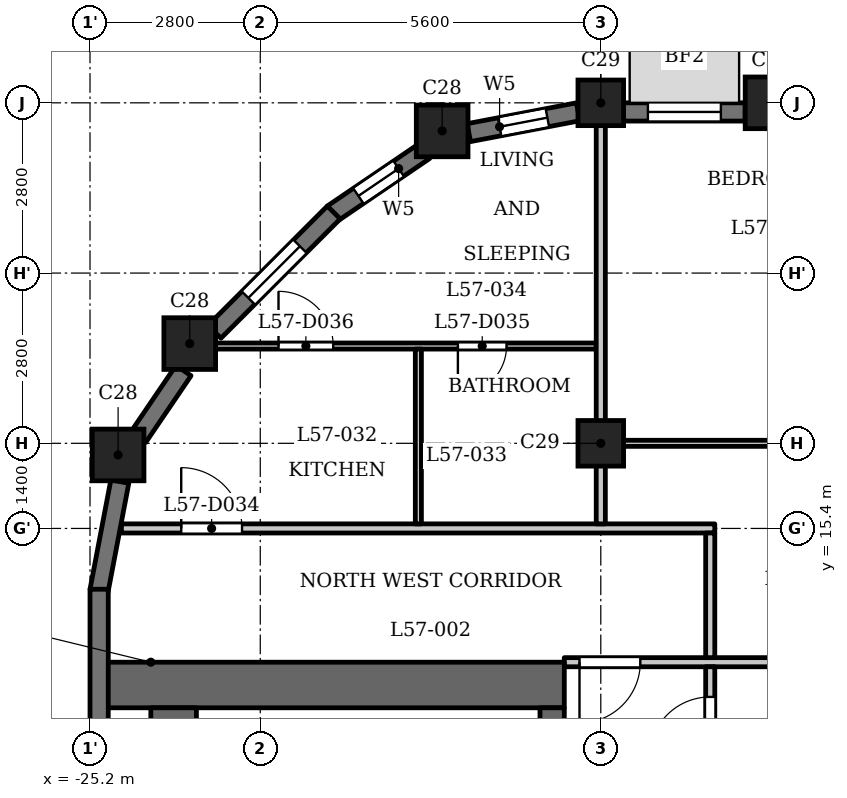
"""IFC4 building model, lengths in metres.
Left out: names, types, materials, properties, quantities, classifications, styles, units other than length and angle.
Written with IfcOpenShell. Run it as: python <this file> out.ifc"""

import sys

from ifc_helpers import new_model, si_unit, direction, frame, frame_2d, origin, origin_2d, place, context, subcontext, project, spatial, rectangle, extrude, element, fill, save


model = new_model("IFC4")
c1 = context("Model", 3, precision=1e-05, world=origin(), true_north=direction((0.0, 1.0)))
c2 = subcontext(c1, "Body", "Model", "MODEL_VIEW")
j1 = project(units=[si_unit("LENGTHUNIT", "METRE"), si_unit("PLANEANGLEUNIT", "RADIAN")], contexts=[c1])
p1 = place(None, origin())
s1 = spatial("IfcSite", under=j1, at=p1, CompositionType="ELEMENT")
p2 = place(p1, origin())
s2 = spatial("IfcBuilding", under=s1, at=p2, CompositionType="ELEMENT")
p3 = place(p2, frame((0.0, 0.0, 220.4)))
s3 = spatial("IfcBuildingStorey", under=s2, at=p3, CompositionType="ELEMENT", Elevation=220.4)
for number, where, z_axis, x_axis in (
    (1, (-14.0, 22.4, 0.0), (0.0, 0.0, 1.0), (1.0, 0.0, 0.0)),
    (2, (-19.409, 21.938, 0.0), (0.0, 0.0, 1.0), (1.0, 0.0, 0.0)),
    (3, (-23.56, 18.44, 0.0), (0.0, 0.0, 1.0), (1.0, 0.0, 0.0)),
    (4, (-24.738, 16.609, 0.0), (0.0, 0.0, 1.0), (1.0, 0.0, 0.0)),
):
    element("IfcColumn", number, at=place(p3, frame(where, z_axis=z_axis, x_axis=x_axis)), inside=s3, PredefinedType="COLUMN", context=c2, shape_type="SweptSolid", body=[
        extrude(rectangle(XDim=0.85, YDim=0.85, at=origin_2d()), origin(), (0.0, 0.0, 1.0), 3.5),
    ])
for number, where, z_axis, x_axis in (
    (5, (-16.8, 16.8, 0.0), (0.0, 0.0, 1.0), (1.0, 0.0, 0.0)),
    (6, (-16.8, 22.4, 0.0), (0.0, 0.0, 1.0), (1.0, 0.0, 0.0)),
):
    element("IfcColumn", number, at=place(p3, frame(where, z_axis=z_axis, x_axis=x_axis)), inside=s3, PredefinedType="COLUMN", context=c2, shape_type="SweptSolid", body=[
        extrude(rectangle(XDim=0.75, YDim=0.75, at=origin_2d()), origin(), (0.0, 0.0, 1.0), 3.5),
    ])
p4 = place(p3, frame((-14.425, 22.25, 0.0), z_axis=(0.0, 0.0, 1.0), x_axis=(-1.0, 0.0, 0.0)))
e7 = element("IfcWall", 7, at=p4, inside=s3, PredefinedType="SOLIDWALL", context=c2, shape_type="SweptSolid", body=[
    extrude(rectangle(XDim=2.0, YDim=0.3, at=frame_2d((1.0, 0.0))), origin(), (0.0, 0.0, 1.0), 2.5),
])
p5 = place(p4, frame((0.4, 0.0, 0.6)))
e8 = element("IfcOpeningElement", 8, at=p5, cuts=e7, PredefinedType="OPENING", context=c2, shape_type="SweptSolid", body=[
    extrude(rectangle(XDim=1.2, YDim=1.55, at=frame_2d((0.6, 0.775))), frame((0.0, 0.16, 0.0), z_axis=(0.0, -1.0, 0.0), x_axis=(1.0, 0.0, 0.0)), (0.0, 0.0, 1.0), 0.32),
])
p6 = place(p3, frame((-17.172, 22.253, 0.0), z_axis=(0.0, 0.0, 1.0), x_axis=(-0.982300037503, -0.187314271538, 0.0)))
e9 = element("IfcWall", 9, at=p6, inside=s3, PredefinedType="SOLIDWALL", context=c2, shape_type="SweptSolid", body=[
    extrude(rectangle(XDim=1.831, YDim=0.3, at=frame_2d((0.916, 0.0))), origin(), (0.0, 0.0, 1.0), 2.5),
])
p7 = place(p6, frame((0.516, 0.0, 0.6)))
e10 = element("IfcOpeningElement", 10, at=p7, cuts=e9, PredefinedType="OPENING", context=c2, shape_type="SweptSolid", body=[
    extrude(rectangle(XDim=0.8, YDim=1.55, at=frame_2d((0.4, 0.775))), frame((0.0, 0.16, 0.0), z_axis=(0.0, -1.0, 0.0), x_axis=(1.0, 0.0, 0.0)), (0.0, 0.0, 1.0), 0.32),
])
p8 = place(p3, frame((-19.698, 21.608, 0.0), z_axis=(0.0, 0.0, 1.0), x_axis=(-0.82705295608, -0.562124014644, 0.0)))
e11 = element("IfcWall", 11, at=p8, inside=s3, PredefinedType="SOLIDWALL", context=c2, shape_type="SweptSolid", body=[
    extrude(rectangle(XDim=1.831, YDim=0.3, at=frame_2d((0.916, 0.0))), origin(), (0.0, 0.0, 1.0), 2.5),
])
p9 = place(p8, frame((0.516, 0.0, 0.6)))
e12 = element("IfcOpeningElement", 12, at=p9, cuts=e11, PredefinedType="OPENING", context=c2, shape_type="SweptSolid", body=[
    extrude(rectangle(XDim=0.8, YDim=1.55, at=frame_2d((0.4, 0.775))), frame((0.0, 0.16, 0.0), z_axis=(0.0, -1.0, 0.0), x_axis=(1.0, 0.0, 0.0)), (0.0, 0.0, 1.0), 0.32),
])
p10 = place(p3, frame((-21.191, 20.597, 0.0), z_axis=(0.0, 0.0, 1.0), x_axis=(-0.707150767798, -0.707062791838, 0.0)))
e13 = element("IfcWall", 13, at=p10, inside=s3, PredefinedType="SOLIDWALL", context=c2, shape_type="SweptSolid", body=[
    extrude(rectangle(XDim=2.775, YDim=0.3, at=frame_2d((1.388, 0.0))), origin(), (0.0, 0.0, 1.0), 2.5),
])
p11 = place(p10, frame((0.788, 0.0, 0.6)))
e14 = element("IfcOpeningElement", 14, at=p11, cuts=e13, PredefinedType="OPENING", context=c2, shape_type="SweptSolid", body=[
    extrude(rectangle(XDim=1.2, YDim=1.55, at=frame_2d((0.6, 0.775))), frame((0.0, 0.16, 0.0), z_axis=(0.0, -1.0, 0.0), x_axis=(1.0, 0.0, 0.0)), (0.0, 0.0, 1.0), 0.32),
])
p12 = place(p3, frame((-23.662, 17.996, 0.0), z_axis=(0.0, 0.0, 1.0), x_axis=(-0.562149004813, -0.827035970432, 0.0)))
e15 = element("IfcWall", 15, at=p12, inside=s3, PredefinedType="SOLIDWALL", context=c2, shape_type="SweptSolid", body=[
    extrude(rectangle(XDim=1.327, YDim=0.3, at=frame_2d((0.664, 0.0))), origin(), (0.0, 0.0, 1.0), 2.5),
])
p13 = place(p3, frame((-24.709, 16.171, 0.0), z_axis=(0.0, 0.0, 1.0), x_axis=(-0.187442908742, -0.982275499014, 0.0)))
e16 = element("IfcWall", 16, at=p13, inside=s3, PredefinedType="SOLIDWALL", context=c2, shape_type="SweptSolid", body=[
    extrude(rectangle(XDim=1.831, YDim=0.3, at=frame_2d((0.916, 0.0))), origin(), (0.0, 0.0, 1.0), 2.5),
])
p14 = place(p3, frame((-25.05, 14.4, 0.0), z_axis=(0.0, 0.0, 1.0), x_axis=(0.0, -1.0, 0.0)))
e17 = element("IfcWall", 17, at=p14, inside=s3, PredefinedType="SOLIDWALL", context=c2, shape_type="SweptSolid", body=[
    extrude(rectangle(XDim=2.775, YDim=0.3, at=frame_2d((1.387, 0.0))), origin(), (0.0, 0.0, 1.0), 2.5),
])
p15 = place(p3, frame((-17.4, 12.825, 0.0), z_axis=(0.0, 0.0, 1.0), x_axis=(-1.0, 0.0, 0.0)))
e18 = element("IfcWall", 18, at=p15, inside=s3, PredefinedType="SHEAR", context=c2, shape_type="SweptSolid", body=[
    extrude(rectangle(XDim=7.6, YDim=0.75, at=frame_2d((3.8, 0.0))), origin(), (0.0, 0.0, 1.0), 3.2),
])
p16 = place(p3, frame((-17.6, -12.45, 0.0), z_axis=(0.0, 0.0, 1.0), x_axis=(0.0, 1.0, 0.0)))
e19 = element("IfcWall", 19, at=p16, inside=s3, PredefinedType="SHEAR", context=c2, shape_type="SweptSolid", body=[
    extrude(rectangle(XDim=24.9, YDim=0.4, at=frame_2d((12.45, 0.0))), origin(), (0.0, 0.0, 1.0), 3.2),
])
p17 = place(p16, frame((6.85, 0.0, 0.0)))
e20 = element("IfcOpeningElement", 20, at=p17, cuts=e19, PredefinedType="OPENING", context=c2, shape_type="SweptSolid", body=[
    extrude(rectangle(XDim=0.9, YDim=2.1, at=frame_2d((0.45, 1.05))), frame((0.0, 0.21, 0.0), z_axis=(0.0, -1.0, 0.0), x_axis=(1.0, 0.0, 0.0)), (0.0, 0.0, 1.0), 0.42),
])
p18 = place(p16, frame((10.45, 0.0, 0.0)))
e21 = element("IfcOpeningElement", 21, at=p18, cuts=e19, PredefinedType="OPENING", context=c2, shape_type="SweptSolid", body=[
    extrude(rectangle(XDim=0.9, YDim=2.1, at=frame_2d((0.45, 1.05))), frame((0.0, 0.21, 0.0), z_axis=(0.0, -1.0, 0.0), x_axis=(1.0, 0.0, 0.0)), (0.0, 0.0, 1.0), 0.42),
])
p19 = place(p16, frame((15.6, 0.0, 0.0)))
e22 = element("IfcOpeningElement", 22, at=p19, cuts=e19, PredefinedType="OPENING", context=c2, shape_type="SweptSolid", body=[
    extrude(rectangle(XDim=1.1, YDim=2.1, at=frame_2d((0.55, 1.05))), frame((0.0, 0.21, 0.0), z_axis=(0.0, -1.0, 0.0), x_axis=(1.0, 0.0, 0.0)), (0.0, 0.0, 1.0), 0.42),
])
p20 = place(p16, frame((18.0, 0.0, 0.0)))
e23 = element("IfcOpeningElement", 23, at=p20, cuts=e19, PredefinedType="OPENING", context=c2, shape_type="SweptSolid", body=[
    extrude(rectangle(XDim=1.1, YDim=2.1, at=frame_2d((0.55, 1.05))), frame((0.0, 0.21, 0.0), z_axis=(0.0, -1.0, 0.0), x_axis=(1.0, 0.0, 0.0)), (0.0, 0.0, 1.0), 0.42),
])
p21 = place(p16, frame((23.025, 0.0, 0.0)))
e24 = element("IfcOpeningElement", 24, at=p21, cuts=e19, PredefinedType="OPENING", context=c2, shape_type="SweptSolid", body=[
    extrude(rectangle(XDim=1.1, YDim=2.1, at=frame_2d((0.55, 1.05))), frame((0.0, 0.21, 0.0), z_axis=(0.0, -1.0, 0.0), x_axis=(1.0, 0.0, 0.0)), (0.0, 0.0, 1.0), 0.42),
])
p22 = place(p16, frame((0.775, 0.0, 0.0)))
e25 = element("IfcOpeningElement", 25, at=p22, cuts=e19, PredefinedType="OPENING", context=c2, shape_type="SweptSolid", body=[
    extrude(rectangle(XDim=1.1, YDim=2.1, at=frame_2d((0.55, 1.05))), frame((0.0, 0.21, 0.0), z_axis=(0.0, -1.0, 0.0), x_axis=(1.0, 0.0, 0.0)), (0.0, 0.0, 1.0), 0.42),
])
p23 = place(p16, frame((12.925, 0.0, 0.0)))
e26 = element("IfcOpeningElement", 26, at=p23, cuts=e19, PredefinedType="OPENING", context=c2, shape_type="SweptSolid", body=[
    extrude(rectangle(XDim=1.8, YDim=2.1, at=frame_2d((0.9, 1.05))), frame((0.0, 0.21, 0.0), z_axis=(0.0, -1.0, 0.0), x_axis=(1.0, 0.0, 0.0)), (0.0, 0.0, 1.0), 0.42),
])
p24 = place(p3, frame((-23.825, -12.45, 0.0), z_axis=(0.0, 0.0, 1.0), x_axis=(0.0, 1.0, 0.0)))
e27 = element("IfcWall", 27, at=p24, inside=s3, PredefinedType="SHEAR", context=c2, shape_type="SweptSolid", body=[
    extrude(rectangle(XDim=24.9, YDim=0.75, at=frame_2d((12.45, 0.0))), origin(), (0.0, 0.0, 1.0), 3.2),
])
p25 = place(p3, frame((-17.4, 13.2, 0.0), z_axis=(0.0, 0.0, 1.0), x_axis=(1.0, 0.0, 0.0)))
e28 = element("IfcWall", 28, at=p25, inside=s3, PredefinedType="PARTITIONING", context=c2, shape_type="SweptSolid", body=[
    extrude(rectangle(XDim=34.8, YDim=0.15, at=frame_2d((17.4, 0.0))), origin(), (0.0, 0.0, 1.0), 3.2),
])
p26 = place(p25, frame((0.25, 0.0, 0.0)))
e29 = element("IfcOpeningElement", 29, at=p26, cuts=e28, PredefinedType="OPENING", context=c2, shape_type="SweptSolid", body=[
    extrude(rectangle(XDim=1.0, YDim=2.1, at=frame_2d((0.5, 1.05))), frame((0.0, 0.085, 0.0), z_axis=(0.0, -1.0, 0.0), x_axis=(1.0, 0.0, 0.0)), (0.0, 0.0, 1.0), 0.17),
])
p27 = place(p25, frame((33.65, 0.0, 0.0)))
e30 = element("IfcOpeningElement", 30, at=p27, cuts=e28, PredefinedType="OPENING", context=c2, shape_type="SweptSolid", body=[
    extrude(rectangle(XDim=1.0, YDim=2.1, at=frame_2d((0.5, 1.05))), frame((0.0, 0.085, 0.0), z_axis=(0.0, -1.0, 0.0), x_axis=(1.0, 0.0, 0.0)), (0.0, 0.0, 1.0), 0.17),
])
p28 = place(p25, frame((15.75, 0.0, 0.0)))
e31 = element("IfcOpeningElement", 31, at=p28, cuts=e28, PredefinedType="OPENING", context=c2, shape_type="SweptSolid", body=[
    extrude(rectangle(XDim=1.0, YDim=2.1, at=frame_2d((0.5, 1.05))), frame((0.0, 0.085, 0.0), z_axis=(0.0, -1.0, 0.0), x_axis=(1.0, 0.0, 0.0)), (0.0, 0.0, 1.0), 0.17),
])
p29 = place(p25, frame((26.95, 0.0, 0.0)))
e32 = element("IfcOpeningElement", 32, at=p29, cuts=e28, PredefinedType="OPENING", context=c2, shape_type="SweptSolid", body=[
    extrude(rectangle(XDim=1.0, YDim=2.1, at=frame_2d((0.5, 1.05))), frame((0.0, 0.085, 0.0), z_axis=(0.0, -1.0, 0.0), x_axis=(1.0, 0.0, 0.0)), (0.0, 0.0, 1.0), 0.17),
])
p30 = place(p25, frame((29.75, 0.0, 0.0)))
e33 = element("IfcOpeningElement", 33, at=p30, cuts=e28, PredefinedType="OPENING", context=c2, shape_type="SweptSolid", body=[
    extrude(rectangle(XDim=1.0, YDim=2.1, at=frame_2d((0.5, 1.05))), frame((0.0, 0.085, 0.0), z_axis=(0.0, -1.0, 0.0), x_axis=(1.0, 0.0, 0.0)), (0.0, 0.0, 1.0), 0.17),
])
p31 = place(p3, frame((-24.684, 15.4, 0.0), z_axis=(0.0, 0.0, 1.0), x_axis=(1.0, 0.0, 0.0)))
e34 = element("IfcWall", 34, at=p31, inside=s3, PredefinedType="PARTITIONING", context=c2, shape_type="SweptSolid", body=[
    extrude(rectangle(XDim=9.759, YDim=0.15, at=frame_2d((4.879, 0.0))), origin(), (0.0, 0.0, 1.0), 3.2),
])
p32 = place(p31, frame((0.984, 0.0, 0.0)))
e35 = element("IfcOpeningElement", 35, at=p32, cuts=e34, PredefinedType="OPENING", context=c2, shape_type="SweptSolid", body=[
    extrude(rectangle(XDim=1.0, YDim=2.1, at=frame_2d((0.5, 1.05))), frame((0.0, 0.085, 0.0), z_axis=(0.0, -1.0, 0.0), x_axis=(1.0, 0.0, 0.0)), (0.0, 0.0, 1.0), 0.17),
])
p33 = place(p3, frame((-16.725, 16.8, 0.0), z_axis=(0.0, 0.0, 1.0), x_axis=(1.0, 0.0, 0.0)))
e36 = element("IfcWall", 36, at=p33, inside=s3, PredefinedType="PARTITIONING", context=c2, shape_type="SweptSolid", body=[
    extrude(rectangle(XDim=33.45, YDim=0.1, at=frame_2d((16.725, 0.0))), origin(), (0.0, 0.0, 1.0), 3.2),
])
p34 = place(p33, frame((11.675, 0.0, 0.0)))
e37 = element("IfcOpeningElement", 37, at=p34, cuts=e36, PredefinedType="OPENING", context=c2, shape_type="SweptSolid", body=[
    extrude(rectangle(XDim=0.9, YDim=2.1, at=frame_2d((0.45, 1.05))), frame((0.0, 0.06, 0.0), z_axis=(0.0, -1.0, 0.0), x_axis=(1.0, 0.0, 0.0)), (0.0, 0.0, 1.0), 0.12),
])
p35 = place(p33, frame((9.575, 0.0, 0.0)))
e38 = element("IfcOpeningElement", 38, at=p35, cuts=e36, PredefinedType="OPENING", context=c2, shape_type="SweptSolid", body=[
    extrude(rectangle(XDim=0.9, YDim=2.1, at=frame_2d((0.45, 1.05))), frame((0.0, 0.06, 0.0), z_axis=(0.0, -1.0, 0.0), x_axis=(1.0, 0.0, 0.0)), (0.0, 0.0, 1.0), 0.12),
])
p36 = place(p33, frame((17.375, 0.0, 0.0)))
e39 = element("IfcOpeningElement", 39, at=p36, cuts=e36, PredefinedType="OPENING", context=c2, shape_type="SweptSolid", body=[
    extrude(rectangle(XDim=0.8, YDim=2.1, at=frame_2d((0.4, 1.05))), frame((0.0, 0.06, 0.0), z_axis=(0.0, -1.0, 0.0), x_axis=(1.0, 0.0, 0.0)), (0.0, 0.0, 1.0), 0.12),
])
p37 = place(p33, frame((19.525, 0.0, 0.0)))
e40 = element("IfcOpeningElement", 40, at=p37, cuts=e36, PredefinedType="OPENING", context=c2, shape_type="SweptSolid", body=[
    extrude(rectangle(XDim=0.9, YDim=2.1, at=frame_2d((0.45, 1.05))), frame((0.0, 0.06, 0.0), z_axis=(0.0, -1.0, 0.0), x_axis=(1.0, 0.0, 0.0)), (0.0, 0.0, 1.0), 0.12),
])
p38 = place(p33, frame((23.775, 0.0, 0.0)))
e41 = element("IfcOpeningElement", 41, at=p38, cuts=e36, PredefinedType="OPENING", context=c2, shape_type="SweptSolid", body=[
    extrude(rectangle(XDim=0.9, YDim=2.1, at=frame_2d((0.45, 1.05))), frame((0.0, 0.06, 0.0), z_axis=(0.0, -1.0, 0.0), x_axis=(1.0, 0.0, 0.0)), (0.0, 0.0, 1.0), 0.12),
])
p39 = place(p33, frame((26.125, 0.0, 0.0)))
e42 = element("IfcOpeningElement", 42, at=p39, cuts=e36, PredefinedType="OPENING", context=c2, shape_type="SweptSolid", body=[
    extrude(rectangle(XDim=0.9, YDim=2.1, at=frame_2d((0.45, 1.05))), frame((0.0, 0.06, 0.0), z_axis=(0.0, -1.0, 0.0), x_axis=(1.0, 0.0, 0.0)), (0.0, 0.0, 1.0), 0.12),
])
p40 = place(p33, frame((32.075, 0.0, 0.0)))
e43 = element("IfcOpeningElement", 43, at=p40, cuts=e36, PredefinedType="OPENING", context=c2, shape_type="SweptSolid", body=[
    extrude(rectangle(XDim=0.8, YDim=2.1, at=frame_2d((0.4, 1.05))), frame((0.0, 0.06, 0.0), z_axis=(0.0, -1.0, 0.0), x_axis=(1.0, 0.0, 0.0)), (0.0, 0.0, 1.0), 0.12),
])
p41 = place(p33, frame((29.175, 0.0, 0.0)))
e44 = element("IfcOpeningElement", 44, at=p41, cuts=e36, PredefinedType="OPENING", context=c2, shape_type="SweptSolid", body=[
    extrude(rectangle(XDim=0.9, YDim=2.1, at=frame_2d((0.45, 1.05))), frame((0.0, 0.06, 0.0), z_axis=(0.0, -1.0, 0.0), x_axis=(1.0, 0.0, 0.0)), (0.0, 0.0, 1.0), 0.12),
])
p42 = place(p3, frame((-23.43, 18.4, 0.0), z_axis=(0.0, 0.0, 1.0), x_axis=(1.0, 0.0, 0.0)))
e45 = element("IfcWall", 45, at=p42, inside=s3, PredefinedType="PARTITIONING", context=c2, shape_type="SweptSolid", body=[
    extrude(rectangle(XDim=6.555, YDim=0.1, at=frame_2d((3.277, 0.0))), origin(), (0.0, 0.0, 1.0), 3.2),
])
p43 = place(p42, frame((4.28, 0.0, 0.0)))
e46 = element("IfcOpeningElement", 46, at=p43, cuts=e45, PredefinedType="OPENING", context=c2, shape_type="SweptSolid", body=[
    extrude(rectangle(XDim=0.8, YDim=2.1, at=frame_2d((0.4, 1.05))), frame((0.0, 0.06, 0.0), z_axis=(0.0, -1.0, 0.0), x_axis=(1.0, 0.0, 0.0)), (0.0, 0.0, 1.0), 0.12),
])
p44 = place(p42, frame((1.33, 0.0, 0.0)))
e47 = element("IfcOpeningElement", 47, at=p44, cuts=e45, PredefinedType="OPENING", context=c2, shape_type="SweptSolid", body=[
    extrude(rectangle(XDim=0.9, YDim=2.1, at=frame_2d((0.45, 1.05))), frame((0.0, 0.06, 0.0), z_axis=(0.0, -1.0, 0.0), x_axis=(1.0, 0.0, 0.0)), (0.0, 0.0, 1.0), 0.12),
])
p45 = place(p3, frame((-19.8, 15.475, 0.0), z_axis=(0.0, 0.0, 1.0), x_axis=(0.0, 1.0, 0.0)))
e48 = element("IfcWall", 48, at=p45, inside=s3, PredefinedType="PARTITIONING", context=c2, shape_type="SweptSolid", body=[
    extrude(rectangle(XDim=2.875, YDim=0.1, at=frame_2d((1.438, 0.0))), origin(), (0.0, 0.0, 1.0), 3.2),
])
p46 = place(p3, frame((-16.8, 15.475, 0.0), z_axis=(0.0, 0.0, 1.0), x_axis=(0.0, 1.0, 0.0)))
e49 = element("IfcWall", 49, at=p46, inside=s3, PredefinedType="PARTITIONING", context=c2, shape_type="SweptSolid", body=[
    extrude(rectangle(XDim=6.835, YDim=0.15, at=frame_2d((3.417, 0.0))), origin(), (0.0, 0.0, 1.0), 2.55),
])
p47 = place(p3, frame((-15.0, 6.769, 0.0), z_axis=(0.0, 0.0, 1.0), x_axis=(0.0, 1.0, 0.0)))
e50 = element("IfcWall", 50, at=p47, inside=s3, PredefinedType="PARTITIONING", context=c2, shape_type="SweptSolid", body=[
    extrude(rectangle(XDim=6.356, YDim=0.15, at=frame_2d((3.178, 0.0))), origin(), (0.0, 0.0, 1.0), 3.2),
])
p48 = place(p47, frame((4.86, 0.0, 0.0)))
e51 = element("IfcOpeningElement", 51, at=p48, cuts=e50, PredefinedType="OPENING", context=c2, shape_type="SweptSolid", body=[
    extrude(rectangle(XDim=1.0, YDim=2.1, at=frame_2d((0.5, 1.05))), frame((0.0, 0.085, 0.0), z_axis=(0.0, -1.0, 0.0), x_axis=(1.0, 0.0, 0.0)), (0.0, 0.0, 1.0), 0.17),
])
p49 = place(p3, frame((-15.0, 13.275, 0.0), z_axis=(0.0, 0.0, 1.0), x_axis=(0.0, 1.0, 0.0)))
e52 = element("IfcWall", 52, at=p49, inside=s3, PredefinedType="PARTITIONING", context=c2, shape_type="SweptSolid", body=[
    extrude(rectangle(XDim=2.05, YDim=0.15, at=frame_2d((1.025, 0.0))), origin(), (0.0, 0.0, 1.0), 3.2),
])
p50 = place(p48, origin())
e53 = element("IfcDoor", 53, at=p50, inside=s3, OperationType="SINGLE_SWING_RIGHT", PredefinedType="DOOR", context=c2, shape_type="SweptSolid", body=[
    extrude(rectangle(XDim=1.0, YDim=2.1, at=frame_2d((0.5, 1.05))), frame((0.0, 0.025, 0.0), z_axis=(0.0, -1.0, 0.0), x_axis=(1.0, 0.0, 0.0)), (0.0, 0.0, 1.0), 0.05),
])
fill(e51, e53)
p51 = place(p26, origin())
e54 = element("IfcDoor", 54, at=p51, inside=s3, OperationType="SINGLE_SWING_LEFT", PredefinedType="DOOR", context=c2, shape_type="SweptSolid", body=[
    extrude(rectangle(XDim=1.0, YDim=2.1, at=frame_2d((0.5, 1.05))), frame((0.0, 0.025, 0.0), z_axis=(0.0, -1.0, 0.0), x_axis=(1.0, 0.0, 0.0)), (0.0, 0.0, 1.0), 0.05),
])
fill(e29, e54)
p52 = place(p32, origin())
e55 = element("IfcDoor", 55, at=p52, inside=s3, OperationType="SINGLE_SWING_RIGHT", PredefinedType="DOOR", context=c2, shape_type="SweptSolid", body=[
    extrude(rectangle(XDim=1.0, YDim=2.1, at=frame_2d((0.5, 1.05))), frame((0.0, 0.025, 0.0), z_axis=(0.0, -1.0, 0.0), x_axis=(1.0, 0.0, 0.0)), (0.0, 0.0, 1.0), 0.05),
])
fill(e35, e55)
p53 = place(p43, origin())
e56 = element("IfcDoor", 56, at=p53, inside=s3, OperationType="SINGLE_SWING_LEFT", PredefinedType="DOOR", context=c2, shape_type="SweptSolid", body=[
    extrude(rectangle(XDim=0.8, YDim=2.1, at=frame_2d((0.4, 1.05))), frame((0.0, 0.025, 0.0), z_axis=(0.0, -1.0, 0.0), x_axis=(1.0, 0.0, 0.0)), (0.0, 0.0, 1.0), 0.05),
])
fill(e46, e56)
p54 = place(p44, origin())
e57 = element("IfcDoor", 57, at=p54, inside=s3, OperationType="SINGLE_SWING_RIGHT", PredefinedType="DOOR", context=c2, shape_type="SweptSolid", body=[
    extrude(rectangle(XDim=0.9, YDim=2.1, at=frame_2d((0.45, 1.05))), frame((0.0, 0.025, 0.0), z_axis=(0.0, -1.0, 0.0), x_axis=(1.0, 0.0, 0.0)), (0.0, 0.0, 1.0), 0.05),
])
fill(e47, e57)
p55 = place(p5, origin())
e58 = element("IfcWindow", 58, at=p55, inside=s3, PartitioningType="SINGLE_PANEL", PredefinedType="WINDOW", context=c2, shape_type="SweptSolid", body=[
    extrude(rectangle(XDim=1.2, YDim=1.55, at=frame_2d((0.6, 0.775))), frame((0.0, 0.03, 0.0), z_axis=(0.0, -1.0, 0.0), x_axis=(1.0, 0.0, 0.0)), (0.0, 0.0, 1.0), 0.06),
])
fill(e8, e58)
p56 = place(p7, origin())
e59 = element("IfcWindow", 59, at=p56, inside=s3, PartitioningType="SINGLE_PANEL", PredefinedType="WINDOW", context=c2, shape_type="SweptSolid", body=[
    extrude(rectangle(XDim=0.8, YDim=1.55, at=frame_2d((0.4, 0.775))), frame((0.0, 0.03, 0.0), z_axis=(0.0, -1.0, 0.0), x_axis=(1.0, 0.0, 0.0)), (0.0, 0.0, 1.0), 0.06),
])
fill(e10, e59)
p57 = place(p9, origin())
e60 = element("IfcWindow", 60, at=p57, inside=s3, PartitioningType="SINGLE_PANEL", PredefinedType="WINDOW", context=c2, shape_type="SweptSolid", body=[
    extrude(rectangle(XDim=0.8, YDim=1.55, at=frame_2d((0.4, 0.775))), frame((0.0, 0.03, 0.0), z_axis=(0.0, -1.0, 0.0), x_axis=(1.0, 0.0, 0.0)), (0.0, 0.0, 1.0), 0.06),
])
fill(e12, e60)
p58 = place(p11, origin())
e61 = element("IfcWindow", 61, at=p58, inside=s3, PartitioningType="SINGLE_PANEL", PredefinedType="WINDOW", context=c2, shape_type="SweptSolid", body=[
    extrude(rectangle(XDim=1.2, YDim=1.55, at=frame_2d((0.6, 0.775))), frame((0.0, 0.03, 0.0), z_axis=(0.0, -1.0, 0.0), x_axis=(1.0, 0.0, 0.0)), (0.0, 0.0, 1.0), 0.06),
])
fill(e14, e61)
save(model, sys.argv[1])
